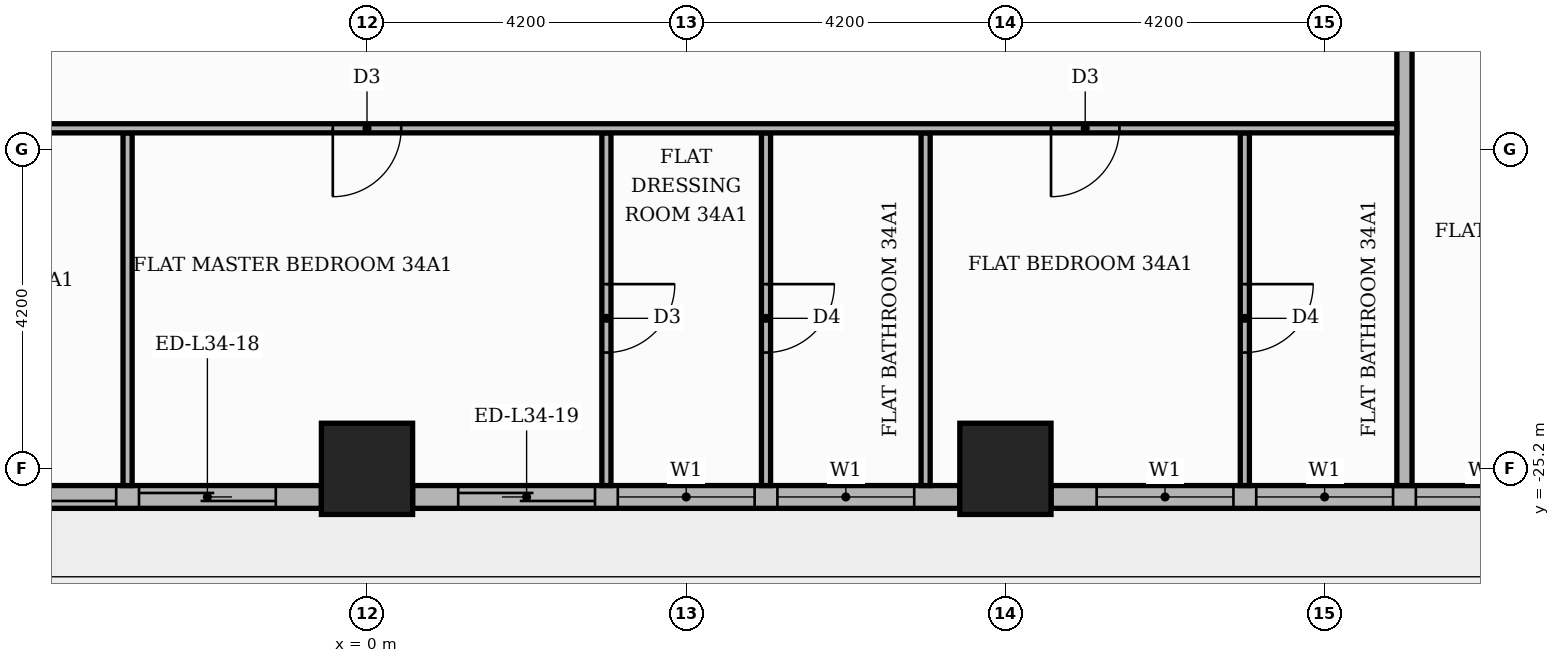
"""IFC4 building model, lengths in metres.
Left out: names, types, materials, properties, quantities, classifications, styles, units other than length and angle.
Written with IfcOpenShell. Run it as: python <this file> out.ifc"""

import sys

from ifc_helpers import new_model, si_unit, direction, frame, frame_2d, origin, origin_2d, place, context, subcontext, project, spatial, rectangle, extrude, element, fill, save


model = new_model("IFC4")
c1 = context("Model", 3, precision=1e-05, world=origin(), true_north=direction((0.0, 1.0)))
c2 = subcontext(c1, "Body", "Model", "MODEL_VIEW")
j1 = project(units=[si_unit("LENGTHUNIT", "METRE"), si_unit("PLANEANGLEUNIT", "RADIAN")], contexts=[c1])
p1 = place(None, origin())
s1 = spatial("IfcSite", under=j1, at=p1, CompositionType="ELEMENT")
p2 = place(p1, origin())
s2 = spatial("IfcBuilding", under=s1, at=p2, CompositionType="ELEMENT")
p3 = place(p2, frame((0.0, 0.0, 145.5)))
s3 = spatial("IfcBuildingStorey", under=s2, at=p3, CompositionType="ELEMENT", Elevation=145.5)
for number, where, z_axis, x_axis in (
    (1, (0.0, -25.2, 0.0), (0.0, 0.0, 1.0), (1.0, 0.0, 0.0)),
    (2, (8.4, -25.2, 0.0), (0.0, 0.0, 1.0), (1.0, 0.0, 0.0)),
):
    element("IfcColumn", number, at=place(p3, frame(where, z_axis=z_axis, x_axis=x_axis)), inside=s3, PredefinedType="COLUMN", context=c2, shape_type="SweptSolid", body=[
        extrude(rectangle(XDim=1.2, YDim=1.2, at=origin_2d()), origin(), (0.0, 0.0, 1.0), 3.9),
    ])
p4 = place(p3, frame((-7.8, -25.57, 0.0), z_axis=(0.0, 0.0, 1.0), x_axis=(1.0, 0.0, 0.0)))
e3 = element("IfcWall", 3, at=p4, inside=s3, PredefinedType="STANDARD", context=c2, shape_type="SweptSolid", body=[
    extrude(rectangle(XDim=7.2, YDim=0.3, at=frame_2d((3.6, 0.0))), origin(), (0.0, 0.0, 1.0), 3.48),
])
p5 = place(p4, frame((0.6, 0.0, 0.0)))
e4 = element("IfcOpeningElement", 4, at=p5, cuts=e3, PredefinedType="OPENING", context=c2, shape_type="SweptSolid", body=[
    extrude(rectangle(XDim=3.9, YDim=2.4, at=frame_2d((1.95, 1.2))), frame((0.0, 0.16, 0.0), z_axis=(0.0, -1.0, 0.0), x_axis=(1.0, 0.0, 0.0)), (0.0, 0.0, 1.0), 0.32),
])
p6 = place(p4, frame((4.8, 0.0, 0.0)))
e5 = element("IfcOpeningElement", 5, at=p6, cuts=e3, PredefinedType="OPENING", context=c2, shape_type="SweptSolid", body=[
    extrude(rectangle(XDim=1.8, YDim=2.4, at=frame_2d((0.9, 1.2))), frame((0.0, 0.16, 0.0), z_axis=(0.0, -1.0, 0.0), x_axis=(1.0, 0.0, 0.0)), (0.0, 0.0, 1.0), 0.32),
])
p7 = place(p3, frame((0.6, -25.57, 0.0), z_axis=(0.0, 0.0, 1.0), x_axis=(1.0, 0.0, 0.0)))
e6 = element("IfcWall", 6, at=p7, inside=s3, PredefinedType="STANDARD", context=c2, shape_type="SweptSolid", body=[
    extrude(rectangle(XDim=7.2, YDim=0.3, at=frame_2d((3.6, 0.0))), origin(), (0.0, 0.0, 1.0), 3.48),
])
p8 = place(p7, frame((0.6, 0.0, 0.0)))
e7 = element("IfcOpeningElement", 7, at=p8, cuts=e6, PredefinedType="OPENING", context=c2, shape_type="SweptSolid", body=[
    extrude(rectangle(XDim=1.8, YDim=2.4, at=frame_2d((0.9, 1.2))), frame((0.0, 0.16, 0.0), z_axis=(0.0, -1.0, 0.0), x_axis=(1.0, 0.0, 0.0)), (0.0, 0.0, 1.0), 0.32),
])
p9 = place(p7, frame((2.7, 0.0, 0.9)))
e8 = element("IfcOpeningElement", 8, at=p9, cuts=e6, PredefinedType="OPENING", context=c2, shape_type="SweptSolid", body=[
    extrude(rectangle(XDim=1.8, YDim=2.1, at=frame_2d((0.9, 1.05))), frame((0.0, 0.16, 0.0), z_axis=(0.0, -1.0, 0.0), x_axis=(1.0, 0.0, 0.0)), (0.0, 0.0, 1.0), 0.32),
])
p10 = place(p7, frame((4.8, 0.0, 0.9)))
e9 = element("IfcOpeningElement", 9, at=p10, cuts=e6, PredefinedType="OPENING", context=c2, shape_type="SweptSolid", body=[
    extrude(rectangle(XDim=1.8, YDim=2.1, at=frame_2d((0.9, 1.05))), frame((0.0, 0.16, 0.0), z_axis=(0.0, -1.0, 0.0), x_axis=(1.0, 0.0, 0.0)), (0.0, 0.0, 1.0), 0.32),
])
p11 = place(p3, frame((9.0, -25.57, 0.0), z_axis=(0.0, 0.0, 1.0), x_axis=(1.0, 0.0, 0.0)))
e10 = element("IfcWall", 10, at=p11, inside=s3, PredefinedType="STANDARD", context=c2, shape_type="SweptSolid", body=[
    extrude(rectangle(XDim=7.2, YDim=0.3, at=frame_2d((3.6, 0.0))), origin(), (0.0, 0.0, 1.0), 3.48),
])
p12 = place(p11, frame((0.6, 0.0, 0.9)))
e11 = element("IfcOpeningElement", 11, at=p12, cuts=e10, PredefinedType="OPENING", context=c2, shape_type="SweptSolid", body=[
    extrude(rectangle(XDim=1.8, YDim=2.1, at=frame_2d((0.9, 1.05))), frame((0.0, 0.16, 0.0), z_axis=(0.0, -1.0, 0.0), x_axis=(1.0, 0.0, 0.0)), (0.0, 0.0, 1.0), 0.32),
])
p13 = place(p11, frame((2.7, 0.0, 0.9)))
e12 = element("IfcOpeningElement", 12, at=p13, cuts=e10, PredefinedType="OPENING", context=c2, shape_type="SweptSolid", body=[
    extrude(rectangle(XDim=1.8, YDim=2.1, at=frame_2d((0.9, 1.05))), frame((0.0, 0.16, 0.0), z_axis=(0.0, -1.0, 0.0), x_axis=(1.0, 0.0, 0.0)), (0.0, 0.0, 1.0), 0.32),
])
p14 = place(p11, frame((4.8, 0.0, 0.9)))
e13 = element("IfcOpeningElement", 13, at=p14, cuts=e10, PredefinedType="OPENING", context=c2, shape_type="SweptSolid", body=[
    extrude(rectangle(XDim=1.8, YDim=2.1, at=frame_2d((0.9, 1.05))), frame((0.0, 0.16, 0.0), z_axis=(0.0, -1.0, 0.0), x_axis=(1.0, 0.0, 0.0)), (0.0, 0.0, 1.0), 0.32),
])
p15 = place(p3, frame((-3.15, -25.42, 0.0), z_axis=(0.0, 0.0, 1.0), x_axis=(0.0, 1.0, 0.0)))
e14 = element("IfcWall", 14, at=p15, inside=s3, PredefinedType="PARTITIONING", context=c2, shape_type="SweptSolid", body=[
    extrude(rectangle(XDim=4.64, YDim=0.12, at=frame_2d((2.32, 0.0))), origin(), (0.0, 0.0, 1.0), 3.48),
])
p16 = place(p3, frame((3.15, -25.42, 0.0), z_axis=(0.0, 0.0, 1.0), x_axis=(0.0, 1.0, 0.0)))
e15 = element("IfcWall", 15, at=p16, inside=s3, PredefinedType="PARTITIONING", context=c2, shape_type="SweptSolid", body=[
    extrude(rectangle(XDim=4.64, YDim=0.12, at=frame_2d((2.32, 0.0))), origin(), (0.0, 0.0, 1.0), 3.48),
])
p17 = place(p16, frame((1.75, 0.0, 0.0)))
e16 = element("IfcOpeningElement", 16, at=p17, cuts=e15, PredefinedType="OPENING", context=c2, shape_type="SweptSolid", body=[
    extrude(rectangle(XDim=0.9, YDim=2.1, at=frame_2d((0.45, 1.05))), frame((0.0, 0.07, 0.0), z_axis=(0.0, -1.0, 0.0), x_axis=(1.0, 0.0, 0.0)), (0.0, 0.0, 1.0), 0.14),
])
p18 = place(p3, frame((5.25, -25.42, 0.0), z_axis=(0.0, 0.0, 1.0), x_axis=(0.0, 1.0, 0.0)))
e17 = element("IfcWall", 17, at=p18, inside=s3, PredefinedType="PARTITIONING", context=c2, shape_type="SweptSolid", body=[
    extrude(rectangle(XDim=4.64, YDim=0.12, at=frame_2d((2.32, 0.0))), origin(), (0.0, 0.0, 1.0), 3.48),
])
p19 = place(p18, frame((1.75, 0.0, 0.0)))
e18 = element("IfcOpeningElement", 18, at=p19, cuts=e17, PredefinedType="OPENING", context=c2, shape_type="SweptSolid", body=[
    extrude(rectangle(XDim=0.9, YDim=2.1, at=frame_2d((0.45, 1.05))), frame((0.0, 0.07, 0.0), z_axis=(0.0, -1.0, 0.0), x_axis=(1.0, 0.0, 0.0)), (0.0, 0.0, 1.0), 0.14),
])
p20 = place(p3, frame((7.35, -25.42, 0.0), z_axis=(0.0, 0.0, 1.0), x_axis=(0.0, 1.0, 0.0)))
e19 = element("IfcWall", 19, at=p20, inside=s3, PredefinedType="PARTITIONING", context=c2, shape_type="SweptSolid", body=[
    extrude(rectangle(XDim=4.64, YDim=0.12, at=frame_2d((2.32, 0.0))), origin(), (0.0, 0.0, 1.0), 3.48),
])
p21 = place(p3, frame((11.55, -25.42, 0.0), z_axis=(0.0, 0.0, 1.0), x_axis=(0.0, 1.0, 0.0)))
e20 = element("IfcWall", 20, at=p21, inside=s3, PredefinedType="PARTITIONING", context=c2, shape_type="SweptSolid", body=[
    extrude(rectangle(XDim=4.64, YDim=0.12, at=frame_2d((2.32, 0.0))), origin(), (0.0, 0.0, 1.0), 3.48),
])
p22 = place(p21, frame((1.75, 0.0, 0.0)))
e21 = element("IfcOpeningElement", 21, at=p22, cuts=e20, PredefinedType="OPENING", context=c2, shape_type="SweptSolid", body=[
    extrude(rectangle(XDim=0.9, YDim=2.1, at=frame_2d((0.45, 1.05))), frame((0.0, 0.07, 0.0), z_axis=(0.0, -1.0, 0.0), x_axis=(1.0, 0.0, 0.0)), (0.0, 0.0, 1.0), 0.14),
])
p23 = place(p3, frame((13.65, -25.42, 0.0), z_axis=(0.0, 0.0, 1.0), x_axis=(0.0, 1.0, 0.0)))
e22 = element("IfcWall", 22, at=p23, inside=s3, PredefinedType="PARTITIONING", context=c2, shape_type="SweptSolid", body=[
    extrude(rectangle(XDim=11.67, YDim=0.2, at=frame_2d((5.835, 0.0))), origin(), (0.0, 0.0, 1.0), 3.48),
])
p24 = place(p3, frame((-25.42, -20.72, 0.0), z_axis=(0.0, 0.0, 1.0), x_axis=(1.0, 0.0, 0.0)))
e23 = element("IfcWall", 23, at=p24, inside=s3, PredefinedType="PARTITIONING", context=c2, shape_type="SweptSolid", body=[
    extrude(rectangle(XDim=38.97, YDim=0.12, at=frame_2d((19.485, 0.0))), origin(), (0.0, 0.0, 1.0), 3.48),
])
p25 = place(p24, frame((12.32, 0.0, 0.0)))
e24 = element("IfcOpeningElement", 24, at=p25, cuts=e23, PredefinedType="OPENING", context=c2, shape_type="SweptSolid", body=[
    extrude(rectangle(XDim=1.0, YDim=2.1, at=frame_2d((0.5, 1.05))), frame((0.0, 0.07, 0.0), z_axis=(0.0, -1.0, 0.0), x_axis=(1.0, 0.0, 0.0)), (0.0, 0.0, 1.0), 0.14),
])
p26 = place(p24, frame((17.57, 0.0, 0.0)))
e25 = element("IfcOpeningElement", 25, at=p26, cuts=e23, PredefinedType="OPENING", context=c2, shape_type="SweptSolid", body=[
    extrude(rectangle(XDim=1.0, YDim=2.1, at=frame_2d((0.5, 1.05))), frame((0.0, 0.07, 0.0), z_axis=(0.0, -1.0, 0.0), x_axis=(1.0, 0.0, 0.0)), (0.0, 0.0, 1.0), 0.14),
])
p27 = place(p24, frame((24.97, 0.0, 0.0)))
e26 = element("IfcOpeningElement", 26, at=p27, cuts=e23, PredefinedType="OPENING", context=c2, shape_type="SweptSolid", body=[
    extrude(rectangle(XDim=0.9, YDim=2.1, at=frame_2d((0.45, 1.05))), frame((0.0, 0.07, 0.0), z_axis=(0.0, -1.0, 0.0), x_axis=(1.0, 0.0, 0.0)), (0.0, 0.0, 1.0), 0.14),
])
p28 = place(p24, frame((34.42, 0.0, 0.0)))
e27 = element("IfcOpeningElement", 27, at=p28, cuts=e23, PredefinedType="OPENING", context=c2, shape_type="SweptSolid", body=[
    extrude(rectangle(XDim=0.9, YDim=2.1, at=frame_2d((0.45, 1.05))), frame((0.0, 0.07, 0.0), z_axis=(0.0, -1.0, 0.0), x_axis=(1.0, 0.0, 0.0)), (0.0, 0.0, 1.0), 0.14),
])
p29 = place(p5, origin())
e28 = element("IfcDoor", 28, at=p29, inside=s3, OperationType="SLIDING_TO_LEFT", PredefinedType="DOOR", context=c2, shape_type="SweptSolid", body=[
    extrude(rectangle(XDim=3.9, YDim=2.4, at=frame_2d((1.95, 1.2))), frame((0.0, 0.025, 0.0), z_axis=(0.0, -1.0, 0.0), x_axis=(1.0, 0.0, 0.0)), (0.0, 0.0, 1.0), 0.05),
])
fill(e4, e28)
p30 = place(p6, origin())
e29 = element("IfcDoor", 29, at=p30, inside=s3, OperationType="SLIDING_TO_RIGHT", PredefinedType="DOOR", context=c2, shape_type="SweptSolid", body=[
    extrude(rectangle(XDim=1.8, YDim=2.4, at=frame_2d((0.9, 1.2))), frame((0.0, 0.025, 0.0), z_axis=(0.0, -1.0, 0.0), x_axis=(1.0, 0.0, 0.0)), (0.0, 0.0, 1.0), 0.05),
])
fill(e5, e29)
p31 = place(p8, origin())
e30 = element("IfcDoor", 30, at=p31, inside=s3, OperationType="SLIDING_TO_LEFT", PredefinedType="DOOR", context=c2, shape_type="SweptSolid", body=[
    extrude(rectangle(XDim=1.8, YDim=2.4, at=frame_2d((0.9, 1.2))), frame((0.0, 0.025, 0.0), z_axis=(0.0, -1.0, 0.0), x_axis=(1.0, 0.0, 0.0)), (0.0, 0.0, 1.0), 0.05),
])
fill(e7, e30)
p32 = place(p9, origin())
e31 = element("IfcWindow", 31, at=p32, inside=s3, PartitioningType="SINGLE_PANEL", PredefinedType="WINDOW", context=c2, shape_type="SweptSolid", body=[
    extrude(rectangle(XDim=1.8, YDim=2.1, at=frame_2d((0.9, 1.05))), frame((0.0, 0.03, 0.0), z_axis=(0.0, -1.0, 0.0), x_axis=(1.0, 0.0, 0.0)), (0.0, 0.0, 1.0), 0.06),
])
fill(e8, e31)
p33 = place(p10, origin())
e32 = element("IfcWindow", 32, at=p33, inside=s3, PartitioningType="SINGLE_PANEL", PredefinedType="WINDOW", context=c2, shape_type="SweptSolid", body=[
    extrude(rectangle(XDim=1.8, YDim=2.1, at=frame_2d((0.9, 1.05))), frame((0.0, 0.03, 0.0), z_axis=(0.0, -1.0, 0.0), x_axis=(1.0, 0.0, 0.0)), (0.0, 0.0, 1.0), 0.06),
])
fill(e9, e32)
p34 = place(p12, origin())
e33 = element("IfcWindow", 33, at=p34, inside=s3, PartitioningType="SINGLE_PANEL", PredefinedType="WINDOW", context=c2, shape_type="SweptSolid", body=[
    extrude(rectangle(XDim=1.8, YDim=2.1, at=frame_2d((0.9, 1.05))), frame((0.0, 0.03, 0.0), z_axis=(0.0, -1.0, 0.0), x_axis=(1.0, 0.0, 0.0)), (0.0, 0.0, 1.0), 0.06),
])
fill(e11, e33)
p35 = place(p13, origin())
e34 = element("IfcWindow", 34, at=p35, inside=s3, PartitioningType="SINGLE_PANEL", PredefinedType="WINDOW", context=c2, shape_type="SweptSolid", body=[
    extrude(rectangle(XDim=1.8, YDim=2.1, at=frame_2d((0.9, 1.05))), frame((0.0, 0.03, 0.0), z_axis=(0.0, -1.0, 0.0), x_axis=(1.0, 0.0, 0.0)), (0.0, 0.0, 1.0), 0.06),
])
fill(e12, e34)
p36 = place(p14, origin())
e35 = element("IfcWindow", 35, at=p36, inside=s3, PartitioningType="SINGLE_PANEL", PredefinedType="WINDOW", context=c2, shape_type="SweptSolid", body=[
    extrude(rectangle(XDim=1.8, YDim=2.1, at=frame_2d((0.9, 1.05))), frame((0.0, 0.03, 0.0), z_axis=(0.0, -1.0, 0.0), x_axis=(1.0, 0.0, 0.0)), (0.0, 0.0, 1.0), 0.06),
])
fill(e13, e35)
p37 = place(p27, frame((0.9, 0.0, 0.0), z_axis=(0.0, 0.0, 1.0), x_axis=(-1.0, 0.0, 0.0)))
e36 = element("IfcDoor", 36, at=p37, inside=s3, OperationType="SINGLE_SWING_LEFT", PredefinedType="DOOR", context=c2, shape_type="SweptSolid", body=[
    extrude(rectangle(XDim=0.9, YDim=2.1, at=frame_2d((0.45, 1.05))), frame((0.0, 0.025, 0.0), z_axis=(0.0, -1.0, 0.0), x_axis=(1.0, 0.0, 0.0)), (0.0, 0.0, 1.0), 0.05),
])
fill(e26, e36)
p38 = place(p17, frame((0.9, 0.0, 0.0), z_axis=(0.0, 0.0, 1.0), x_axis=(-1.0, 0.0, 0.0)))
e37 = element("IfcDoor", 37, at=p38, inside=s3, OperationType="SINGLE_SWING_RIGHT", PredefinedType="DOOR", context=c2, shape_type="SweptSolid", body=[
    extrude(rectangle(XDim=0.9, YDim=2.1, at=frame_2d((0.45, 1.05))), frame((0.0, 0.025, 0.0), z_axis=(0.0, -1.0, 0.0), x_axis=(1.0, 0.0, 0.0)), (0.0, 0.0, 1.0), 0.05),
])
fill(e16, e37)
p39 = place(p19, frame((0.9, 0.0, 0.0), z_axis=(0.0, 0.0, 1.0), x_axis=(-1.0, 0.0, 0.0)))
e38 = element("IfcDoor", 38, at=p39, inside=s3, OperationType="SINGLE_SWING_RIGHT", PredefinedType="DOOR", context=c2, shape_type="SweptSolid", body=[
    extrude(rectangle(XDim=0.9, YDim=2.1, at=frame_2d((0.45, 1.05))), frame((0.0, 0.025, 0.0), z_axis=(0.0, -1.0, 0.0), x_axis=(1.0, 0.0, 0.0)), (0.0, 0.0, 1.0), 0.05),
])
fill(e18, e38)
p40 = place(p28, frame((0.9, 0.0, 0.0), z_axis=(0.0, 0.0, 1.0), x_axis=(-1.0, 0.0, 0.0)))
e39 = element("IfcDoor", 39, at=p40, inside=s3, OperationType="SINGLE_SWING_LEFT", PredefinedType="DOOR", context=c2, shape_type="SweptSolid", body=[
    extrude(rectangle(XDim=0.9, YDim=2.1, at=frame_2d((0.45, 1.05))), frame((0.0, 0.025, 0.0), z_axis=(0.0, -1.0, 0.0), x_axis=(1.0, 0.0, 0.0)), (0.0, 0.0, 1.0), 0.05),
])
fill(e27, e39)
p41 = place(p22, frame((0.9, 0.0, 0.0), z_axis=(0.0, 0.0, 1.0), x_axis=(-1.0, 0.0, 0.0)))
e40 = element("IfcDoor", 40, at=p41, inside=s3, OperationType="SINGLE_SWING_RIGHT", PredefinedType="DOOR", context=c2, shape_type="SweptSolid", body=[
    extrude(rectangle(XDim=0.9, YDim=2.1, at=frame_2d((0.45, 1.05))), frame((0.0, 0.025, 0.0), z_axis=(0.0, -1.0, 0.0), x_axis=(1.0, 0.0, 0.0)), (0.0, 0.0, 1.0), 0.05),
])
fill(e21, e40)
save(model, sys.argv[1])
